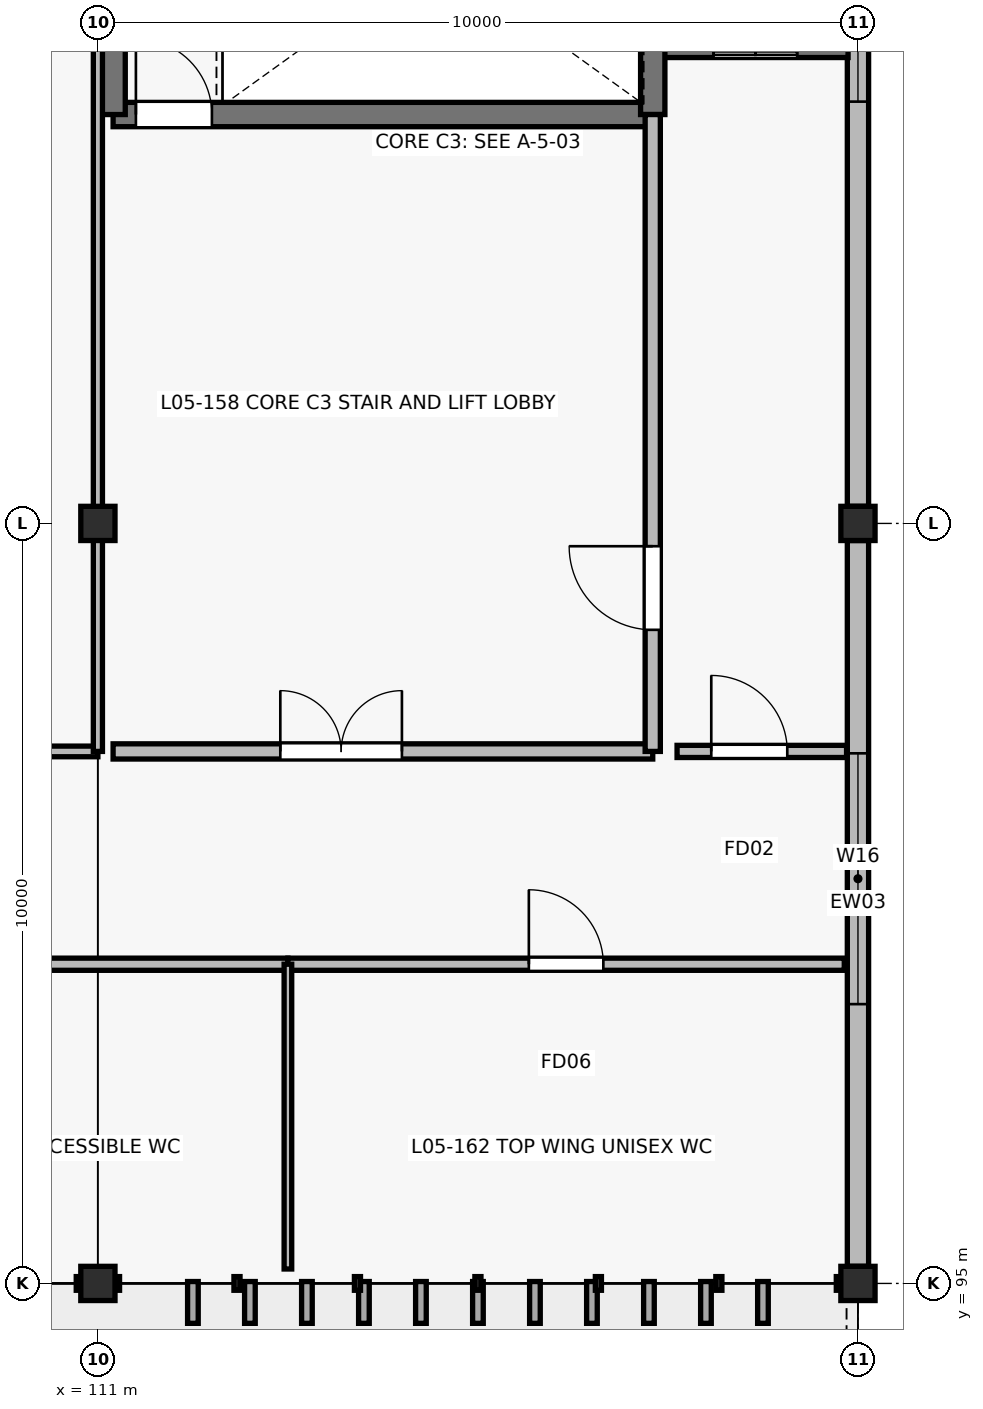
"""IFC4 building model, lengths in metres.
Left out: names, types, materials, properties, quantities, classifications, styles, units other than length and angle.
Written with IfcOpenShell. Run it as: python <this file> out.ifc"""

import sys

from ifc_helpers import new_model, si_unit, direction, frame, frame_2d, origin, origin_2d, place, context, subcontext, project, spatial, rectangle, extrude, element, fill, save


model = new_model("IFC4")
c1 = context("Model", 3, precision=1e-05, world=origin(), true_north=direction((0.0, 1.0)))
c2 = subcontext(c1, "Body", "Model", "MODEL_VIEW")
j1 = project(units=[si_unit("LENGTHUNIT", "METRE"), si_unit("PLANEANGLEUNIT", "RADIAN")], contexts=[c1])
p1 = place(None, origin())
s1 = spatial("IfcSite", under=j1, at=p1, CompositionType="ELEMENT")
p2 = place(p1, origin())
s2 = spatial("IfcBuilding", under=s1, at=p2, CompositionType="ELEMENT")
p3 = place(p2, frame((0.0, 0.0, 21.6)))
s3 = spatial("IfcBuildingStorey", under=s2, at=p3, CompositionType="ELEMENT", Elevation=21.6)
for number, where, z_axis, x_axis in (
    (1, (111.0, 95.0, 0.0), (0.0, 0.0, 1.0), (1.0, 0.0, 0.0)),
    (2, (111.0, 105.0, 0.0), (0.0, 0.0, 1.0), (1.0, 0.0, 0.0)),
    (3, (121.0, 95.0, 0.0), (0.0, 0.0, 1.0), (1.0, 0.0, 0.0)),
    (4, (121.0, 105.0, 0.0), (0.0, 0.0, 1.0), (1.0, 0.0, 0.0)),
):
    element("IfcColumn", number, at=place(p3, frame(where, z_axis=z_axis, x_axis=x_axis)), inside=s3, PredefinedType="COLUMN", context=c2, shape_type="SweptSolid", body=[
        extrude(rectangle(XDim=0.45, YDim=0.45, at=origin_2d()), origin(), (0.0, 0.0, 1.0), 4.2),
    ])
p4 = place(p3, frame((121.0, 104.775, 0.0), z_axis=(0.0, 0.0, 1.0), x_axis=(0.0, -1.0, 0.0)))
e5 = element("IfcWall", 5, at=p4, inside=s3, PredefinedType="SOLIDWALL", context=c2, shape_type="SweptSolid", body=[
    extrude(rectangle(XDim=9.55, YDim=0.28, at=frame_2d((4.775, 0.0))), origin(), (0.0, 0.0, 1.0), 3.25),
])
p5 = place(p4, frame((2.8, 0.0, 0.9)))
e6 = element("IfcOpeningElement", 6, at=p5, cuts=e5, PredefinedType="OPENING", context=c2, shape_type="SweptSolid", body=[
    extrude(rectangle(XDim=3.3, YDim=1.8, at=frame_2d((1.65, 0.9))), frame((0.0, 0.15, 0.0), z_axis=(0.0, -1.0, 0.0), x_axis=(1.0, 0.0, 0.0)), (0.0, 0.0, 1.0), 0.3),
])
p6 = place(p3, frame((121.0, 114.85, 0.0), z_axis=(0.0, 0.0, 1.0), x_axis=(0.0, -1.0, 0.0)))
e7 = element("IfcWall", 7, at=p6, inside=s3, PredefinedType="SOLIDWALL", context=c2, shape_type="SweptSolid", body=[
    extrude(rectangle(XDim=9.625, YDim=0.28, at=frame_2d((4.812, 0.0))), origin(), (0.0, 0.0, 1.0), 3.25),
])
p7 = place(p6, frame((2.8, 0.0, 0.9)))
e8 = element("IfcOpeningElement", 8, at=p7, cuts=e7, PredefinedType="OPENING", context=c2, shape_type="SweptSolid", body=[
    extrude(rectangle(XDim=1.5, YDim=2.1, at=frame_2d((0.75, 1.05))), frame((0.0, 0.15, 0.0), z_axis=(0.0, -1.0, 0.0), x_axis=(1.0, 0.0, 0.0)), (0.0, 0.0, 1.0), 0.3),
])
p8 = place(p3, frame((120.87, 111.25, 0.0), z_axis=(0.0, 0.0, 1.0), x_axis=(-1.0, 0.0, 0.0)))
e9 = element("IfcWall", 9, at=p8, inside=s3, PredefinedType="SHEAR", context=c2, shape_type="SweptSolid", body=[
    extrude(rectangle(XDim=2.44, YDim=0.24, at=frame_2d((1.22, 0.0))), origin(), (0.0, 0.0, 1.0), 3.95),
])
p9 = place(p8, frame((0.67, 0.0, 0.0)))
e10 = element("IfcOpeningElement", 10, at=p9, cuts=e9, PredefinedType="OPENING", context=c2, shape_type="SweptSolid", body=[
    extrude(rectangle(XDim=1.1, YDim=2.15, at=frame_2d((0.55, 1.075))), frame((0.0, 0.13, 0.0), z_axis=(0.0, -1.0, 0.0), x_axis=(1.0, 0.0, 0.0)), (0.0, 0.0, 1.0), 0.26),
])
p10 = place(p3, frame((111.2, 110.38, 0.0), z_axis=(0.0, 0.0, 1.0), x_axis=(1.0, 0.0, 0.0)))
e11 = element("IfcWall", 11, at=p10, inside=s3, PredefinedType="SHEAR", context=c2, shape_type="SweptSolid", body=[
    extrude(rectangle(XDim=7.1, YDim=0.32, at=frame_2d((3.55, 0.0))), origin(), (0.0, 0.0, 1.0), 3.95),
])
p11 = place(p10, frame((0.3, 0.0, 0.0)))
e12 = element("IfcOpeningElement", 12, at=p11, cuts=e11, PredefinedType="OPENING", context=c2, shape_type="SweptSolid", body=[
    extrude(rectangle(XDim=1.0, YDim=2.15, at=frame_2d((0.5, 1.075))), frame((0.0, 0.17, 0.0), z_axis=(0.0, -1.0, 0.0), x_axis=(1.0, 0.0, 0.0)), (0.0, 0.0, 1.0), 0.34),
])
for number, where, z_axis, x_axis in (
    (13, (118.3, 110.38, 0.0), (0.0, 0.0, 1.0), (0.0, 1.0, 0.0)),
    (14, (111.2, 114.62, 0.0), (0.0, 0.0, 1.0), (0.0, -1.0, 0.0)),
):
    element("IfcWall", number, at=place(p3, frame(where, z_axis=z_axis, x_axis=x_axis)), inside=s3, PredefinedType="SHEAR", context=c2, shape_type="SweptSolid", body=[
        extrude(rectangle(XDim=4.24, YDim=0.32, at=frame_2d((2.12, 0.0))), origin(), (0.0, 0.0, 1.0), 3.95),
    ])
p12 = place(p3, frame((111.2, 102.0, 0.0), z_axis=(0.0, 0.0, 1.0), x_axis=(1.0, 0.0, 0.0)))
e15 = element("IfcWall", 15, at=p12, inside=s3, PredefinedType="PARTITIONING", context=c2, shape_type="SweptSolid", body=[
    extrude(rectangle(XDim=7.1, YDim=0.2, at=frame_2d((3.55, 0.0))), origin(), (0.0, 0.0, 1.0), 3.25),
])
p13 = place(p12, frame((2.2, 0.0, 0.0)))
e16 = element("IfcOpeningElement", 16, at=p13, cuts=e15, PredefinedType="OPENING", context=c2, shape_type="SweptSolid", body=[
    extrude(rectangle(XDim=1.6, YDim=2.2, at=frame_2d((0.8, 1.1))), frame((0.0, 0.11, 0.0), z_axis=(0.0, -1.0, 0.0), x_axis=(1.0, 0.0, 0.0)), (0.0, 0.0, 1.0), 0.22),
])
p14 = place(p3, frame((118.3, 102.0, 0.0), z_axis=(0.0, 0.0, 1.0), x_axis=(0.0, 1.0, 0.0)))
e17 = element("IfcWall", 17, at=p14, inside=s3, PredefinedType="PARTITIONING", context=c2, shape_type="SweptSolid", body=[
    extrude(rectangle(XDim=8.38, YDim=0.2, at=frame_2d((4.19, 0.0))), origin(), (0.0, 0.0, 1.0), 3.3),
])
p15 = place(p14, frame((1.6, 0.0, 0.0)))
e18 = element("IfcOpeningElement", 18, at=p15, cuts=e17, PredefinedType="OPENING", context=c2, shape_type="SweptSolid", body=[
    extrude(rectangle(XDim=1.1, YDim=2.15, at=frame_2d((0.55, 1.075))), frame((0.0, 0.11, 0.0), z_axis=(0.0, -1.0, 0.0), x_axis=(1.0, 0.0, 0.0)), (0.0, 0.0, 1.0), 0.22),
])
p16 = place(p3, frame((118.62, 102.0, 0.0), z_axis=(0.0, 0.0, 1.0), x_axis=(1.0, 0.0, 0.0)))
e19 = element("IfcWall", 19, at=p16, inside=s3, PredefinedType="PARTITIONING", context=c2, shape_type="SweptSolid", body=[
    extrude(rectangle(XDim=2.23, YDim=0.16, at=frame_2d((1.115, 0.0))), origin(), (0.0, 0.0, 1.0), 3.25),
])
p17 = place(p16, frame((0.45, 0.0, 0.0)))
e20 = element("IfcOpeningElement", 20, at=p17, cuts=e19, PredefinedType="OPENING", context=c2, shape_type="SweptSolid", body=[
    extrude(rectangle(XDim=1.0, YDim=2.15, at=frame_2d((0.5, 1.075))), frame((0.0, 0.09, 0.0), z_axis=(0.0, -1.0, 0.0), x_axis=(1.0, 0.0, 0.0)), (0.0, 0.0, 1.0), 0.18),
])
p18 = place(p3, frame((106.1, 99.2, 0.0), z_axis=(0.0, 0.0, 1.0), x_axis=(1.0, 0.0, 0.0)))
e21 = element("IfcWall", 21, at=p18, inside=s3, PredefinedType="PARTITIONING", context=c2, shape_type="SweptSolid", body=[
    extrude(rectangle(XDim=7.4, YDim=0.16, at=frame_2d((3.7, 0.0))), origin(), (0.0, 0.0, 1.0), 3.25),
])
p19 = place(p18, frame((3.21, 0.0, 0.0)))
e22 = element("IfcOpeningElement", 22, at=p19, cuts=e21, PredefinedType="OPENING", context=c2, shape_type="SweptSolid", body=[
    extrude(rectangle(XDim=0.98, YDim=2.1, at=frame_2d((0.49, 1.05))), frame((0.0, 0.09, 0.0), z_axis=(0.0, -1.0, 0.0), x_axis=(1.0, 0.0, 0.0)), (0.0, 0.0, 1.0), 0.18),
])
p20 = place(p3, frame((113.5, 99.2, 0.0), z_axis=(0.0, 0.0, 1.0), x_axis=(1.0, 0.0, 0.0)))
e23 = element("IfcWall", 23, at=p20, inside=s3, PredefinedType="PARTITIONING", context=c2, shape_type="SweptSolid", body=[
    extrude(rectangle(XDim=7.32, YDim=0.16, at=frame_2d((3.66, 0.0))), origin(), (0.0, 0.0, 1.0), 3.25),
])
p21 = place(p20, frame((3.17, 0.0, 0.0)))
e24 = element("IfcOpeningElement", 24, at=p21, cuts=e23, PredefinedType="OPENING", context=c2, shape_type="SweptSolid", body=[
    extrude(rectangle(XDim=0.98, YDim=2.1, at=frame_2d((0.49, 1.05))), frame((0.0, 0.09, 0.0), z_axis=(0.0, -1.0, 0.0), x_axis=(1.0, 0.0, 0.0)), (0.0, 0.0, 1.0), 0.18),
])
p22 = place(p3, frame((113.5, 95.19, 0.0), z_axis=(0.0, 0.0, 1.0), x_axis=(0.0, 1.0, 0.0)))
e25 = element("IfcWall", 25, at=p22, inside=s3, PredefinedType="PARTITIONING", context=c2, shape_type="SweptSolid", body=[
    extrude(rectangle(XDim=4.01, YDim=0.1, at=frame_2d((2.005, 0.0))), origin(), (0.0, 0.0, 1.0), 3.3),
])
p23 = place(p3, frame((101.0, 102.0, 0.0), z_axis=(0.0, 0.0, 1.0), x_axis=(1.0, 0.0, 0.0)))
e26 = element("IfcWall", 26, at=p23, inside=s3, PredefinedType="PARTITIONING", context=c2, shape_type="SweptSolid", body=[
    extrude(rectangle(XDim=10.0, YDim=0.14, at=frame_2d((5.0, 0.0))), origin(), (0.0, 0.0, 1.0), 3.25),
])
p24 = place(p23, frame((4.3, 0.0, 0.0)))
e27 = element("IfcOpeningElement", 27, at=p24, cuts=e26, PredefinedType="OPENING", context=c2, shape_type="SweptSolid", body=[
    extrude(rectangle(XDim=1.4, YDim=2.2, at=frame_2d((0.7, 1.1))), frame((0.0, 0.08, 0.0), z_axis=(0.0, -1.0, 0.0), x_axis=(1.0, 0.0, 0.0)), (0.0, 0.0, 1.0), 0.16),
])
p25 = place(p3, frame((111.0, 102.0, 0.0), z_axis=(0.0, 0.0, 1.0), x_axis=(0.0, 1.0, 0.0)))
e28 = element("IfcWall", 28, at=p25, inside=s3, PredefinedType="PARTITIONING", context=c2, shape_type="SweptSolid", body=[
    extrude(rectangle(XDim=12.75, YDim=0.12, at=frame_2d((6.375, 0.0))), origin(), (0.0, 0.0, 1.0), 3.25),
])
p26 = place(p5, origin())
e29 = element("IfcWindow", 29, at=p26, inside=s3, PartitioningType="DOUBLE_PANEL_VERTICAL", PredefinedType="WINDOW", context=c2, shape_type="SweptSolid", body=[
    extrude(rectangle(XDim=3.3, YDim=1.8, at=frame_2d((1.65, 0.9))), frame((0.0, 0.03, 0.0), z_axis=(0.0, -1.0, 0.0), x_axis=(1.0, 0.0, 0.0)), (0.0, 0.0, 1.0), 0.06),
])
fill(e6, e29)
p27 = place(p7, origin())
e30 = element("IfcWindow", 30, at=p27, inside=s3, PartitioningType="SINGLE_PANEL", PredefinedType="WINDOW", context=c2, shape_type="SweptSolid", body=[
    extrude(rectangle(XDim=1.5, YDim=2.1, at=frame_2d((0.75, 1.05))), frame((0.0, 0.03, 0.0), z_axis=(0.0, -1.0, 0.0), x_axis=(1.0, 0.0, 0.0)), (0.0, 0.0, 1.0), 0.06),
])
fill(e8, e30)
p28 = place(p11, origin())
e31 = element("IfcDoor", 31, at=p28, inside=s3, OperationType="SINGLE_SWING_LEFT", PredefinedType="DOOR", context=c2, shape_type="SweptSolid", body=[
    extrude(rectangle(XDim=1.0, YDim=2.15, at=frame_2d((0.5, 1.075))), frame((0.0, 0.025, 0.0), z_axis=(0.0, -1.0, 0.0), x_axis=(1.0, 0.0, 0.0)), (0.0, 0.0, 1.0), 0.05),
])
fill(e12, e31)
p29 = place(p13, origin())
e32 = element("IfcDoor", 32, at=p29, inside=s3, OperationType="DOUBLE_DOOR_SINGLE_SWING", PredefinedType="DOOR", context=c2, shape_type="SweptSolid", body=[
    extrude(rectangle(XDim=1.6, YDim=2.2, at=frame_2d((0.8, 1.1))), frame((0.0, 0.025, 0.0), z_axis=(0.0, -1.0, 0.0), x_axis=(1.0, 0.0, 0.0)), (0.0, 0.0, 1.0), 0.05),
])
fill(e16, e32)
p30 = place(p15, origin())
e33 = element("IfcDoor", 33, at=p30, inside=s3, OperationType="SINGLE_SWING_RIGHT", PredefinedType="DOOR", context=c2, shape_type="SweptSolid", body=[
    extrude(rectangle(XDim=1.1, YDim=2.15, at=frame_2d((0.55, 1.075))), frame((0.0, 0.025, 0.0), z_axis=(0.0, -1.0, 0.0), x_axis=(1.0, 0.0, 0.0)), (0.0, 0.0, 1.0), 0.05),
])
fill(e18, e33)
p31 = place(p17, origin())
e34 = element("IfcDoor", 34, at=p31, inside=s3, OperationType="SINGLE_SWING_LEFT", PredefinedType="DOOR", context=c2, shape_type="SweptSolid", body=[
    extrude(rectangle(XDim=1.0, YDim=2.15, at=frame_2d((0.5, 1.075))), frame((0.0, 0.025, 0.0), z_axis=(0.0, -1.0, 0.0), x_axis=(1.0, 0.0, 0.0)), (0.0, 0.0, 1.0), 0.05),
])
fill(e20, e34)
p32 = place(p21, origin())
e35 = element("IfcDoor", 35, at=p32, inside=s3, OperationType="SINGLE_SWING_LEFT", PredefinedType="DOOR", context=c2, shape_type="SweptSolid", body=[
    extrude(rectangle(XDim=0.98, YDim=2.1, at=frame_2d((0.49, 1.05))), frame((0.0, 0.025, 0.0), z_axis=(0.0, -1.0, 0.0), x_axis=(1.0, 0.0, 0.0)), (0.0, 0.0, 1.0), 0.05),
])
fill(e24, e35)
save(model, sys.argv[1])
